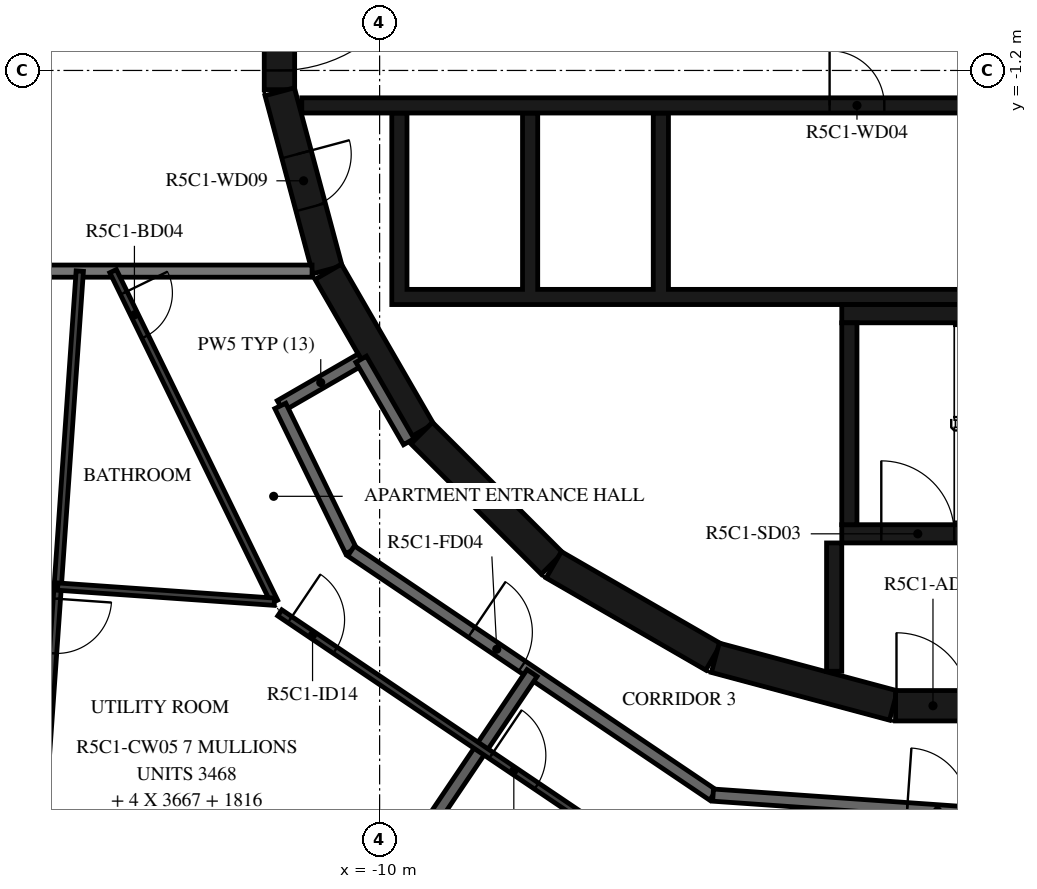
"""IFC4 building model, lengths in metres.
Left out: names, types, materials, properties, quantities, classifications, styles, units other than length and angle.
Written with IfcOpenShell. Run it as: python <this file> out.ifc"""

import sys

from ifc_helpers import new_model, si_unit, direction, frame, frame_2d, origin, place, context, subcontext, project, spatial, polyline, rectangle, outline, extrude, element, fill, save


model = new_model("IFC4")
c1 = context("Model", 3, precision=1e-05, world=origin(), true_north=direction((0.0, 1.0)))
c2 = subcontext(c1, "Body", "Model", "MODEL_VIEW")
j1 = project(units=[si_unit("LENGTHUNIT", "METRE"), si_unit("PLANEANGLEUNIT", "RADIAN")], contexts=[c1])
p1 = place(None, origin())
s1 = spatial("IfcSite", under=j1, at=p1, CompositionType="ELEMENT")
p2 = place(p1, origin())
s2 = spatial("IfcBuilding", under=s1, at=p2, CompositionType="ELEMENT")
p3 = place(p2, frame((0.0, 0.0, 212.9)))
s3 = spatial("IfcBuildingStorey", under=s2, at=p3, CompositionType="ELEMENT", Elevation=212.9)
p4 = place(p3, frame((-11.647, 1.516, 0.0), z_axis=(0.0, 0.0, 1.0), x_axis=(0.0, -1.0, 0.0)))
e1 = element("IfcWall", 1, at=p4, inside=s3, PredefinedType="SHEAR", context=c2, shape_type="SweptSolid", body=[
    extrude(rectangle(XDim=3.033, YDim=0.5, at=frame_2d((1.516, 0.0))), origin(), (0.0, 0.0, 1.0), 3.12),
])
p5 = place(p4, frame((0.316, 0.0, 0.0)))
e2 = element("IfcOpeningElement", 2, at=p5, cuts=e1, PredefinedType="OPENING", context=c2, shape_type="SweptSolid", body=[
    extrude(rectangle(XDim=2.4, YDim=2.1, at=frame_2d((1.2, 1.05))), frame((0.0, 0.26, 0.0), z_axis=(0.0, -1.0, 0.0), x_axis=(1.0, 0.0, 0.0)), (0.0, 0.0, 1.0), 0.52),
])
p6 = place(p3, frame((-11.643, -1.55, 0.0), z_axis=(0.0, 0.0, 1.0), x_axis=(0.258734743916, -0.965948410781, 0.0)))
e3 = element("IfcWall", 3, at=p6, inside=s3, PredefinedType="SHEAR", context=c2, shape_type="SweptSolid", body=[
    extrude(rectangle(XDim=3.033, YDim=0.5, at=frame_2d((1.516, 0.0))), origin(), (0.0, 0.0, 1.0), 3.12),
])
p7 = place(p6, frame((1.066, 0.0, 0.0)))
e4 = element("IfcOpeningElement", 4, at=p7, cuts=e3, PredefinedType="OPENING", context=c2, shape_type="SweptSolid", body=[
    extrude(rectangle(XDim=0.9, YDim=2.1, at=frame_2d((0.45, 1.05))), frame((0.0, 0.26, 0.0), z_axis=(0.0, -1.0, 0.0), x_axis=(1.0, 0.0, 0.0)), (0.0, 0.0, 1.0), 0.52),
])
p8 = place(p3, frame((-10.845, -4.51, 0.0), z_axis=(0.0, 0.0, 1.0), x_axis=(0.500087131594, -0.865975092491, 0.0)))
e5 = element("IfcWall", 5, at=p8, inside=s3, PredefinedType="SHEAR", context=c2, shape_type="SweptSolid", body=[
    extrude(rectangle(XDim=3.033, YDim=0.5, at=frame_2d((1.516, 0.0))), origin(), (0.0, 0.0, 1.0), 3.12),
])
p9 = place(p3, frame((-9.308, -7.164, 0.0), z_axis=(0.0, 0.0, 1.0), x_axis=(0.707106781187, -0.707106781187, 0.0)))
e6 = element("IfcWall", 6, at=p9, inside=s3, PredefinedType="SHEAR", context=c2, shape_type="SweptSolid", body=[
    extrude(rectangle(XDim=3.032, YDim=0.5, at=frame_2d((1.516, 0.0))), origin(), (0.0, 0.0, 1.0), 3.12),
])
for number, where, z_axis, x_axis in (
    (7, (-7.137, -9.329, 0.0), (0.0, 0.0, 1.0), (0.866, -0.5, 0.0)),
    (8, (-4.479, -10.858, 0.0), (0.0, 0.0, 1.0), (0.966, -0.259, 0.0)),
):
    element("IfcWall", number, at=place(p3, frame(where, z_axis=z_axis, x_axis=x_axis)), inside=s3, PredefinedType="SHEAR", context=c2, shape_type="SweptSolid", body=[
        extrude(rectangle(XDim=3.033, YDim=0.5, at=frame_2d((1.516, 0.0))), origin(), (0.0, 0.0, 1.0), 3.12),
    ])
p10 = place(p3, frame((-1.516, -11.647, 0.0), z_axis=(0.0, 0.0, 1.0), x_axis=(1.0, 0.0, 0.0)))
e9 = element("IfcWall", 9, at=p10, inside=s3, PredefinedType="SHEAR", context=c2, shape_type="SweptSolid", body=[
    extrude(rectangle(XDim=3.033, YDim=0.5, at=frame_2d((1.516, 0.0))), origin(), (0.0, 0.0, 1.0), 3.12),
])
p11 = place(p10, frame((0.016, 0.0, 0.0)))
e10 = element("IfcOpeningElement", 10, at=p11, cuts=e9, PredefinedType="OPENING", context=c2, shape_type="SweptSolid", body=[
    extrude(rectangle(XDim=1.2, YDim=2.1, at=frame_2d((0.6, 1.05))), frame((0.0, 0.26, 0.0), z_axis=(0.0, -1.0, 0.0), x_axis=(1.0, 0.0, 0.0)), (0.0, 0.0, 1.0), 0.52),
])
p12 = place(p3, frame((-2.275, -8.67, 0.0), z_axis=(0.0, 0.0, 1.0), x_axis=(0.0, 1.0, 0.0)))
e11 = element("IfcWall", 11, at=p12, inside=s3, PredefinedType="SHEAR", context=c2, shape_type="SweptSolid", body=[
    extrude(rectangle(XDim=3.32, YDim=0.25, at=frame_2d((1.66, 0.0))), origin(), (0.0, 0.0, 1.0), 3.12),
])
p13 = place(p3, frame((-2.4, -5.2, 0.0), z_axis=(0.0, 0.0, 1.0), x_axis=(1.0, 0.0, 0.0)))
e12 = element("IfcWall", 12, at=p13, inside=s3, PredefinedType="SHEAR", context=c2, shape_type="SweptSolid", body=[
    extrude(rectangle(XDim=7.05, YDim=0.3, at=frame_2d((3.525, 0.0))), origin(), (0.0, 0.0, 1.0), 3.12),
])
p14 = place(p3, frame((-2.4, -8.82, 0.0), z_axis=(0.0, 0.0, 1.0), x_axis=(1.0, 0.0, 0.0)))
e13 = element("IfcWall", 13, at=p14, inside=s3, PredefinedType="SHEAR", context=c2, shape_type="SweptSolid", body=[
    extrude(rectangle(XDim=2.5, YDim=0.3, at=frame_2d((1.25, 0.0))), origin(), (0.0, 0.0, 1.0), 3.12),
])
p15 = place(p14, frame((0.65, 0.0, 0.0)))
e14 = element("IfcOpeningElement", 14, at=p15, cuts=e13, PredefinedType="OPENING", context=c2, shape_type="SweptSolid", body=[
    extrude(rectangle(XDim=1.2, YDim=2.1, at=frame_2d((0.6, 1.05))), frame((0.0, 0.16, 0.0), z_axis=(0.0, -1.0, 0.0), x_axis=(1.0, 0.0, 0.0)), (0.0, 0.0, 1.0), 0.32),
])
p16 = place(p3, frame((-2.525, -8.97, 0.0), z_axis=(0.0, 0.0, 1.0), x_axis=(0.0, -1.0, 0.0)))
e15 = element("IfcWall", 15, at=p16, inside=s3, PredefinedType="SHEAR", context=c2, shape_type="SweptSolid", body=[
    extrude(rectangle(XDim=2.11, YDim=0.25, at=frame_2d((1.055, 0.0))), origin(), (0.0, 0.0, 1.0), 3.12),
])
p17 = place(p3, origin())
e16 = element("IfcWall", 16, at=p17, inside=s3, PredefinedType="SHEAR", context=c2, shape_type="SweptSolid", body=[
    extrude(outline(polyline([(9.8, -5.05), (9.8, -4.8), (9.8, -1.9), (9.55, -1.9), (9.55, -4.8), (7.65, -4.8), (7.65, -1.9), (7.4, -1.9), (7.4, -4.8), (5.5, -4.8), (5.5, -1.9), (5.25, -1.9), (5.25, -4.8), (3.35, -4.8), (3.35, -1.9), (3.1, -1.9), (3.1, -4.8), (1.2, -4.8), (1.2, -1.9), (0.95, -1.9), (0.95, -4.8), (-5.25, -4.8), (-5.25, -1.9), (-5.5, -1.9), (-5.5, -4.8), (-7.4, -4.8), (-7.4, -1.9), (-7.65, -1.9), (-7.65, -4.8), (-9.55, -4.8), (-9.55, -1.9), (-9.8, -1.9), (-9.8, -4.8), (-9.8, -5.05), (9.8, -5.05)])), origin(), (0.0, 0.0, 1.0), 3.12),
])
p18 = place(p3, frame((-11.28, -1.775, 0.0), z_axis=(0.0, 0.0, 1.0), x_axis=(1.0, 0.0, 0.0)))
e17 = element("IfcWall", 17, at=p18, inside=s3, PredefinedType="SHEAR", context=c2, shape_type="SweptSolid", body=[
    extrude(rectangle(XDim=14.38, YDim=0.25, at=frame_2d((7.19, 0.0))), origin(), (0.0, 0.0, 1.0), 3.12),
])
p19 = place(p18, frame((12.88, 0.0, 0.0)))
e18 = element("IfcOpeningElement", 18, at=p19, cuts=e17, PredefinedType="OPENING", context=c2, shape_type="SweptSolid", body=[
    extrude(rectangle(XDim=1.1, YDim=2.1, at=frame_2d((0.55, 1.05))), frame((0.0, 0.135, 0.0), z_axis=(0.0, -1.0, 0.0), x_axis=(1.0, 0.0, 0.0)), (0.0, 0.0, 1.0), 0.27),
])
p20 = place(p18, frame((8.68, 0.0, 0.0)))
e19 = element("IfcOpeningElement", 19, at=p20, cuts=e17, PredefinedType="OPENING", context=c2, shape_type="SweptSolid", body=[
    extrude(rectangle(XDim=0.9, YDim=2.1, at=frame_2d((0.45, 1.05))), frame((0.0, 0.135, 0.0), z_axis=(0.0, -1.0, 0.0), x_axis=(1.0, 0.0, 0.0)), (0.0, 0.0, 1.0), 0.27),
])
p21 = place(p3, frame((-10.303, -5.949, 0.0), z_axis=(0.0, 0.0, 1.0), x_axis=(-0.866042588199, -0.499970234539, 0.0)))
e20 = element("IfcWall", 20, at=p21, inside=s3, PredefinedType="STANDARD", context=c2, shape_type="SweptSolid", body=[
    extrude(rectangle(XDim=1.535, YDim=0.2, at=frame_2d((0.768, 0.0))), origin(), (0.0, 0.0, 1.0), 3.12),
])
p22 = place(p3, frame((-11.633, -6.716, 0.0), z_axis=(0.0, 0.0, 1.0), x_axis=(0.438322116278, -0.898817958422, 0.0)))
e21 = element("IfcWall", 21, at=p22, inside=s3, PredefinedType="STANDARD", context=c2, shape_type="SweptSolid", body=[
    extrude(rectangle(XDim=2.654, YDim=0.2, at=frame_2d((1.327, 0.0))), origin(), (0.0, 0.0, 1.0), 3.12),
])
p23 = place(p3, frame((-10.47, -9.101, 0.0), z_axis=(0.0, 0.0, 1.0), x_axis=(0.829035841718, -0.559195469534, 0.0)))
e22 = element("IfcWall", 22, at=p23, inside=s3, PredefinedType="STANDARD", context=c2, shape_type="SweptSolid", body=[
    extrude(rectangle(XDim=7.181, YDim=0.2, at=frame_2d((3.591, 0.0))), origin(), (0.0, 0.0, 1.0), 3.12),
])
p24 = place(p23, frame((2.39, 0.0, 0.0)))
e23 = element("IfcOpeningElement", 23, at=p24, cuts=e22, PredefinedType="OPENING", context=c2, shape_type="SweptSolid", body=[
    extrude(rectangle(XDim=1.0, YDim=2.1, at=frame_2d((0.5, 1.05))), frame((0.0, 0.11, 0.0), z_axis=(0.0, -1.0, 0.0), x_axis=(1.0, 0.0, 0.0)), (0.0, 0.0, 1.0), 0.22),
])
p25 = place(p3, frame((-9.52, -7.305, 0.0), z_axis=(0.0, 0.0, 1.0), x_axis=(-0.500028278809, 0.866009076391, 0.0)))
e24 = element("IfcWall", 24, at=p25, inside=s3, PredefinedType="STANDARD", context=c2, shape_type="SweptSolid", body=[
    extrude(rectangle(XDim=1.566, YDim=0.2, at=frame_2d((0.783, 0.0))), origin(), (0.0, 0.0, 1.0), 3.12),
])
p26 = place(p3, frame((-4.517, -13.117, 0.0), z_axis=(0.0, 0.0, 1.0), x_axis=(0.997564669554, -0.069747616856, 0.0)))
e25 = element("IfcWall", 25, at=p26, inside=s3, PredefinedType="STANDARD", context=c2, shape_type="SweptSolid", body=[
    extrude(rectangle(XDim=6.885, YDim=0.2, at=frame_2d((3.443, 0.0))), origin(), (0.0, 0.0, 1.0), 3.12),
])
p27 = place(p26, frame((3.2, 0.0, 0.0)))
e26 = element("IfcOpeningElement", 26, at=p27, cuts=e25, PredefinedType="OPENING", context=c2, shape_type="SweptSolid", body=[
    extrude(rectangle(XDim=1.0, YDim=2.1, at=frame_2d((0.5, 1.05))), frame((0.0, 0.11, 0.0), z_axis=(0.0, -1.0, 0.0), x_axis=(1.0, 0.0, 0.0)), (0.0, 0.0, 1.0), 0.22),
])
p28 = place(p3, frame((-17.9, -4.5, 0.0), z_axis=(0.0, 0.0, 1.0), x_axis=(1.0, 0.0, 0.0)))
e27 = element("IfcWall", 27, at=p28, inside=s3, PredefinedType="STANDARD", context=c2, shape_type="SweptSolid", body=[
    extrude(rectangle(XDim=6.789, YDim=0.2, at=frame_2d((3.394, 0.0))), origin(), (0.0, 0.0, 1.0), 3.12),
])
p29 = place(p3, frame((-10.408, -15.43, 0.0), z_axis=(0.0, 0.0, 1.0), x_axis=(0.559199317758, 0.829033246027, 0.0)))
e28 = element("IfcWall", 28, at=p29, inside=s3, PredefinedType="STANDARD", context=c2, shape_type="SweptSolid", body=[
    extrude(rectangle(XDim=5.212, YDim=0.2, at=frame_2d((2.606, 0.0))), origin(), (0.0, 0.0, 1.0), 3.12),
])
p30 = place(p3, frame((-14.383, -4.5, 0.0), z_axis=(0.0, 0.0, 1.0), x_axis=(0.438393414895, -0.898783185077, 0.0)))
e29 = element("IfcWall", 29, at=p30, inside=s3, PredefinedType="PARTITIONING", context=c2, shape_type="SweptSolid", body=[
    extrude(rectangle(XDim=6.049, YDim=0.12, at=frame_2d((3.024, 0.0))), origin(), (0.0, 0.0, 1.0), 3.12),
])
p31 = place(p30, frame((0.4, 0.0, 0.0)))
e30 = element("IfcOpeningElement", 30, at=p31, cuts=e29, PredefinedType="OPENING", context=c2, shape_type="SweptSolid", body=[
    extrude(rectangle(XDim=0.8, YDim=2.1, at=frame_2d((0.4, 1.05))), frame((0.0, 0.07, 0.0), z_axis=(0.0, -1.0, 0.0), x_axis=(1.0, 0.0, 0.0)), (0.0, 0.0, 1.0), 0.14),
])
p32 = place(p3, frame((-11.642, -10.12, 0.0), z_axis=(0.0, 0.0, 1.0), x_axis=(0.829029427133, -0.559204979365, 0.0)))
e31 = element("IfcWall", 31, at=p32, inside=s3, PredefinedType="PARTITIONING", context=c2, shape_type="SweptSolid", body=[
    extrude(rectangle(XDim=6.904, YDim=0.12, at=frame_2d((3.452, 0.0))), origin(), (0.0, 0.0, 1.0), 3.12),
])
p33 = place(p32, frame((0.2, 0.0, 0.0)))
e32 = element("IfcOpeningElement", 32, at=p33, cuts=e31, PredefinedType="OPENING", context=c2, shape_type="SweptSolid", body=[
    extrude(rectangle(XDim=0.9, YDim=2.1, at=frame_2d((0.45, 1.05))), frame((0.0, 0.07, 0.0), z_axis=(0.0, -1.0, 0.0), x_axis=(1.0, 0.0, 0.0)), (0.0, 0.0, 1.0), 0.14),
])
p34 = place(p32, frame((4.192, 0.0, 0.0)))
e33 = element("IfcOpeningElement", 33, at=p34, cuts=e31, PredefinedType="OPENING", context=c2, shape_type="SweptSolid", body=[
    extrude(rectangle(XDim=0.9, YDim=2.1, at=frame_2d((0.45, 1.05))), frame((0.0, 0.07, 0.0), z_axis=(0.0, -1.0, 0.0), x_axis=(1.0, 0.0, 0.0)), (0.0, 0.0, 1.0), 0.14),
])
p35 = place(p3, frame((-14.931, -4.5, 0.0), z_axis=(0.0, 0.0, 1.0), x_axis=(-0.069751708439, -0.997564383471, 0.0)))
e34 = element("IfcWall", 34, at=p35, inside=s3, PredefinedType="PARTITIONING", context=c2, shape_type="SweptSolid", body=[
    extrude(rectangle(XDim=11.894, YDim=0.12, at=frame_2d((5.947, 0.0))), origin(), (0.0, 0.0, 1.0), 3.12),
])
p36 = place(p35, frame((5.4, 0.0, 0.0)))
e35 = element("IfcOpeningElement", 35, at=p36, cuts=e34, PredefinedType="OPENING", context=c2, shape_type="SweptSolid", body=[
    extrude(rectangle(XDim=0.9, YDim=2.1, at=frame_2d((0.45, 1.05))), frame((0.0, 0.07, 0.0), z_axis=(0.0, -1.0, 0.0), x_axis=(1.0, 0.0, 0.0)), (0.0, 0.0, 1.0), 0.14),
])
p37 = place(p3, frame((-15.294, -9.688, 0.0), z_axis=(0.0, 0.0, 1.0), x_axis=(0.997565819809, -0.069731163391, 0.0)))
e36 = element("IfcWall", 36, at=p37, inside=s3, PredefinedType="PARTITIONING", context=c2, shape_type="SweptSolid", body=[
    extrude(rectangle(XDim=3.571, YDim=0.12, at=frame_2d((1.786, 0.0))), origin(), (0.0, 0.0, 1.0), 3.12),
])
p38 = place(p15, origin())
e37 = element("IfcDoor", 37, at=p38, inside=s3, OperationType="SINGLE_SWING_LEFT", PredefinedType="DOOR", context=c2, shape_type="SweptSolid", body=[
    extrude(rectangle(XDim=1.2, YDim=2.1, at=frame_2d((0.6, 1.05))), frame((0.0, 0.025, 0.0), z_axis=(0.0, -1.0, 0.0), x_axis=(1.0, 0.0, 0.0)), (0.0, 0.0, 1.0), 0.05),
])
fill(e14, e37)
p39 = place(p11, origin())
e38 = element("IfcDoor", 38, at=p39, inside=s3, OperationType="SINGLE_SWING_RIGHT", PredefinedType="DOOR", context=c2, shape_type="SweptSolid", body=[
    extrude(rectangle(XDim=1.2, YDim=2.1, at=frame_2d((0.6, 1.05))), frame((0.0, 0.025, 0.0), z_axis=(0.0, -1.0, 0.0), x_axis=(1.0, 0.0, 0.0)), (0.0, 0.0, 1.0), 0.05),
])
fill(e10, e38)
p40 = place(p5, origin())
e39 = element("IfcDoor", 39, at=p40, inside=s3, OperationType="DOUBLE_DOOR_SINGLE_SWING", PredefinedType="DOOR", context=c2, shape_type="SweptSolid", body=[
    extrude(rectangle(XDim=2.4, YDim=2.1, at=frame_2d((1.2, 1.05))), frame((0.0, 0.025, 0.0), z_axis=(0.0, -1.0, 0.0), x_axis=(1.0, 0.0, 0.0)), (0.0, 0.0, 1.0), 0.05),
])
fill(e2, e39)
p41 = place(p20, origin())
e40 = element("IfcDoor", 40, at=p41, inside=s3, OperationType="SINGLE_SWING_RIGHT", PredefinedType="DOOR", context=c2, shape_type="SweptSolid", body=[
    extrude(rectangle(XDim=0.9, YDim=2.1, at=frame_2d((0.45, 1.05))), frame((0.0, 0.025, 0.0), z_axis=(0.0, -1.0, 0.0), x_axis=(1.0, 0.0, 0.0)), (0.0, 0.0, 1.0), 0.05),
])
fill(e19, e40)
p42 = place(p7, origin())
e41 = element("IfcDoor", 41, at=p42, inside=s3, OperationType="SINGLE_SWING_LEFT", PredefinedType="DOOR", context=c2, shape_type="SweptSolid", body=[
    extrude(rectangle(XDim=0.9, YDim=2.1, at=frame_2d((0.45, 1.05))), frame((0.0, 0.025, 0.0), z_axis=(0.0, -1.0, 0.0), x_axis=(1.0, 0.0, 0.0)), (0.0, 0.0, 1.0), 0.05),
])
fill(e4, e41)
p43 = place(p24, origin())
e42 = element("IfcDoor", 42, at=p43, inside=s3, OperationType="SINGLE_SWING_RIGHT", PredefinedType="DOOR", context=c2, shape_type="SweptSolid", body=[
    extrude(rectangle(XDim=1.0, YDim=2.1, at=frame_2d((0.5, 1.05))), frame((0.0, 0.025, 0.0), z_axis=(0.0, -1.0, 0.0), x_axis=(1.0, 0.0, 0.0)), (0.0, 0.0, 1.0), 0.05),
])
fill(e23, e42)
p44 = place(p31, origin())
e43 = element("IfcDoor", 43, at=p44, inside=s3, OperationType="SINGLE_SWING_RIGHT", PredefinedType="DOOR", context=c2, shape_type="SweptSolid", body=[
    extrude(rectangle(XDim=0.8, YDim=2.1, at=frame_2d((0.4, 1.05))), frame((0.0, 0.025, 0.0), z_axis=(0.0, -1.0, 0.0), x_axis=(1.0, 0.0, 0.0)), (0.0, 0.0, 1.0), 0.05),
])
fill(e30, e43)
p45 = place(p33, origin())
e44 = element("IfcDoor", 44, at=p45, inside=s3, OperationType="SINGLE_SWING_RIGHT", PredefinedType="DOOR", context=c2, shape_type="SweptSolid", body=[
    extrude(rectangle(XDim=0.9, YDim=2.1, at=frame_2d((0.45, 1.05))), frame((0.0, 0.025, 0.0), z_axis=(0.0, -1.0, 0.0), x_axis=(1.0, 0.0, 0.0)), (0.0, 0.0, 1.0), 0.05),
])
fill(e32, e44)
p46 = place(p36, origin())
e45 = element("IfcDoor", 45, at=p46, inside=s3, OperationType="SINGLE_SWING_RIGHT", PredefinedType="DOOR", context=c2, shape_type="SweptSolid", body=[
    extrude(rectangle(XDim=0.9, YDim=2.1, at=frame_2d((0.45, 1.05))), frame((0.0, 0.025, 0.0), z_axis=(0.0, -1.0, 0.0), x_axis=(1.0, 0.0, 0.0)), (0.0, 0.0, 1.0), 0.05),
])
fill(e35, e45)
p47 = place(p27, origin())
e46 = element("IfcDoor", 46, at=p47, inside=s3, OperationType="SINGLE_SWING_LEFT", PredefinedType="DOOR", context=c2, shape_type="SweptSolid", body=[
    extrude(rectangle(XDim=1.0, YDim=2.1, at=frame_2d((0.5, 1.05))), frame((0.0, 0.025, 0.0), z_axis=(0.0, -1.0, 0.0), x_axis=(1.0, 0.0, 0.0)), (0.0, 0.0, 1.0), 0.05),
])
fill(e26, e46)
p48 = place(p34, origin())
e47 = element("IfcDoor", 47, at=p48, inside=s3, OperationType="SINGLE_SWING_LEFT", PredefinedType="DOOR", context=c2, shape_type="SweptSolid", body=[
    extrude(rectangle(XDim=0.9, YDim=2.1, at=frame_2d((0.45, 1.05))), frame((0.0, 0.025, 0.0), z_axis=(0.0, -1.0, 0.0), x_axis=(1.0, 0.0, 0.0)), (0.0, 0.0, 1.0), 0.05),
])
fill(e33, e47)
save(model, sys.argv[1])
